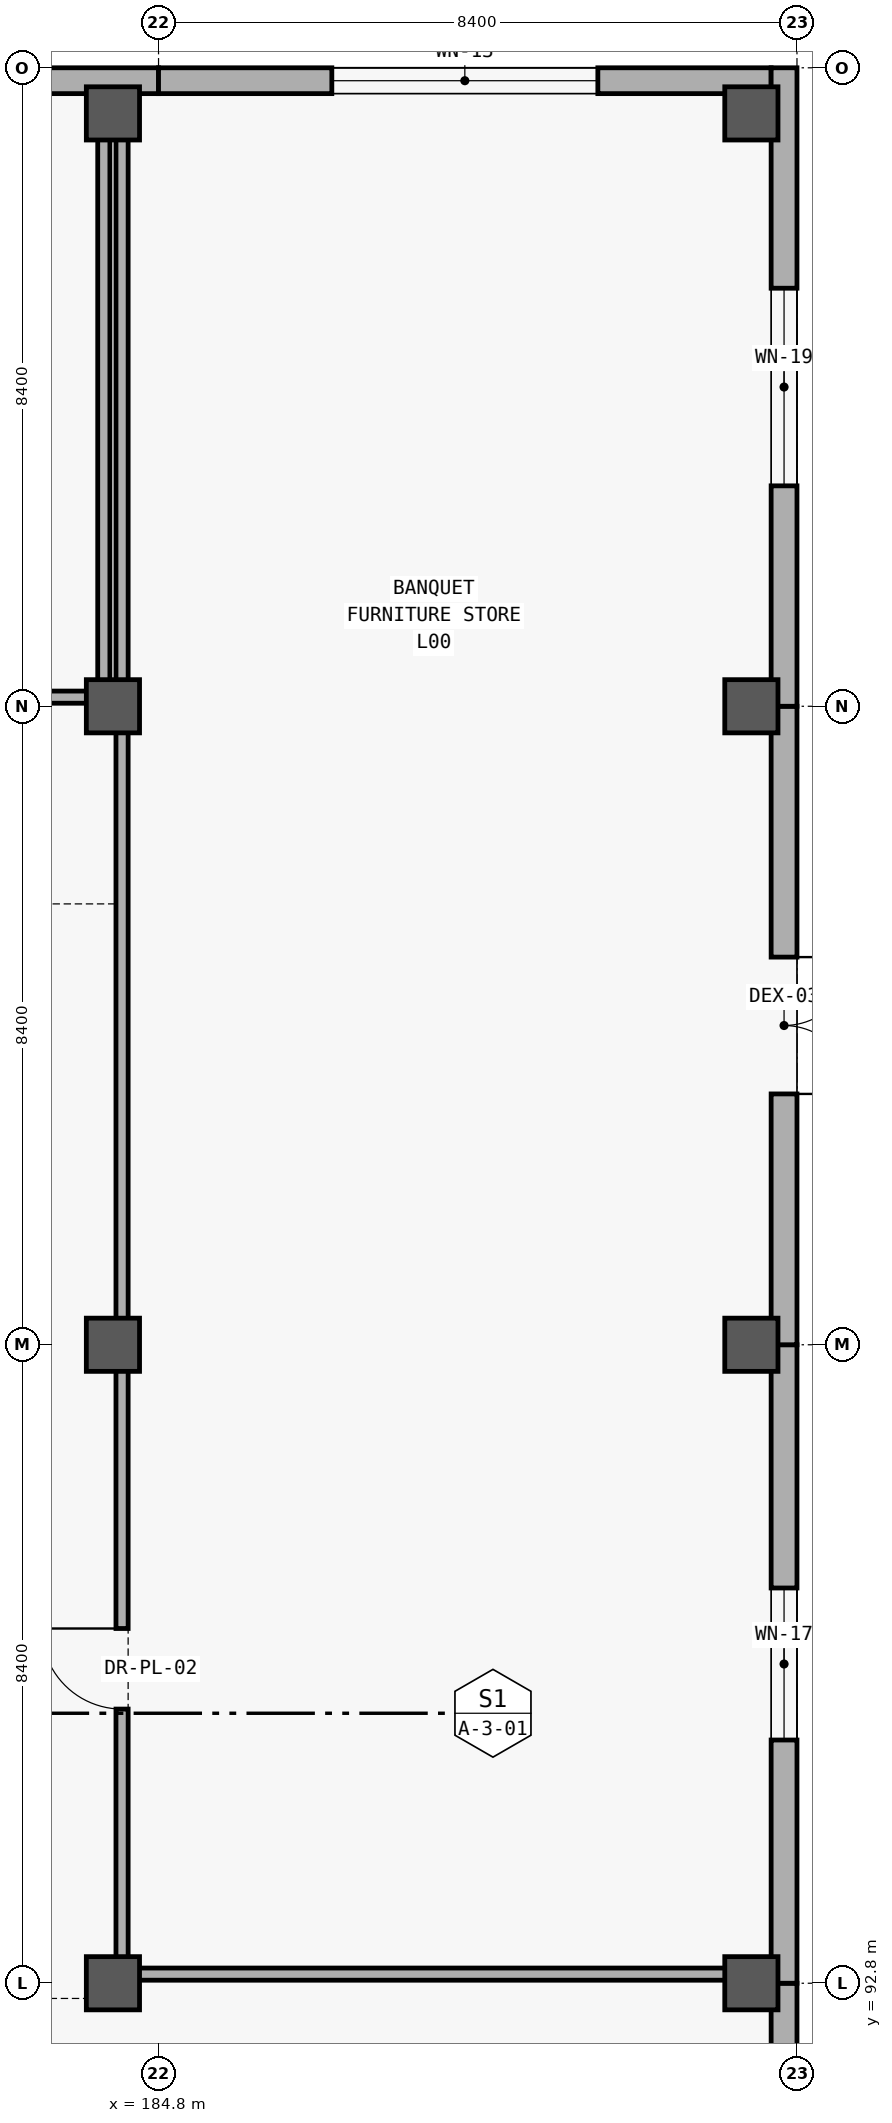
"""IFC4 building model, lengths in metres.
Left out: names, types, materials, properties, quantities, classifications, styles, units other than length and angle.
Written with IfcOpenShell. Run it as: python <this file> out.ifc"""

import sys

from ifc_helpers import new_model, si_unit, direction, frame, frame_2d, origin, origin_2d, place, context, subcontext, project, spatial, rectangle, extrude, element, fill, save


model = new_model("IFC4")
c1 = context("Model", 3, precision=1e-05, world=origin(), true_north=direction((0.0, 1.0)))
c2 = subcontext(c1, "Body", "Model", "MODEL_VIEW")
j1 = project(units=[si_unit("LENGTHUNIT", "METRE"), si_unit("PLANEANGLEUNIT", "RADIAN")], contexts=[c1])
p1 = place(None, origin())
s1 = spatial("IfcSite", under=j1, at=p1, CompositionType="ELEMENT")
p2 = place(p1, origin())
s2 = spatial("IfcBuilding", under=s1, at=p2, CompositionType="ELEMENT")
p3 = place(p2, origin())
s3 = spatial("IfcBuildingStorey", under=s2, at=p3, CompositionType="ELEMENT", Elevation=0.0)
for number, where, z_axis, x_axis in (
    (1, (184.2, 92.8, 0.0), (0.0, 0.0, 1.0), (1.0, 0.0, 0.0)),
    (2, (184.2, 101.2, 0.0), (0.0, 0.0, 1.0), (1.0, 0.0, 0.0)),
    (3, (184.2, 109.6, 0.0), (0.0, 0.0, 1.0), (1.0, 0.0, 0.0)),
    (4, (184.2, 117.4, 0.0), (0.0, 0.0, 1.0), (1.0, 0.0, 0.0)),
    (5, (192.6, 92.8, 0.0), (0.0, 0.0, 1.0), (1.0, 0.0, 0.0)),
    (6, (192.6, 101.2, 0.0), (0.0, 0.0, 1.0), (1.0, 0.0, 0.0)),
    (7, (192.6, 109.6, 0.0), (0.0, 0.0, 1.0), (1.0, 0.0, 0.0)),
    (8, (192.6, 117.4, 0.0), (0.0, 0.0, 1.0), (1.0, 0.0, 0.0)),
):
    element("IfcColumn", number, at=place(p3, frame(where, z_axis=z_axis, x_axis=x_axis)), inside=s3, PredefinedType="COLUMN", context=c2, shape_type="SweptSolid", body=[
        extrude(rectangle(XDim=0.7, YDim=0.7, at=origin_2d()), origin(), (0.0, 0.0, 1.0), 5.4),
    ])
p4 = place(p3, frame((176.4, 117.83, 0.0), z_axis=(0.0, 0.0, 1.0), x_axis=(1.0, 0.0, 0.0)))
e9 = element("IfcWall", 9, at=p4, inside=s3, PredefinedType="SOLIDWALL", context=c2, shape_type="SweptSolid", body=[
    extrude(rectangle(XDim=8.4, YDim=0.34, at=frame_2d((4.2, 0.0))), origin(), (0.0, 0.0, 1.0), 5.08),
])
p5 = place(p4, frame((3.2, 0.0, 0.0)))
e10 = element("IfcOpeningElement", 10, at=p5, cuts=e9, PredefinedType="OPENING", context=c2, shape_type="SweptSolid", body=[
    extrude(rectangle(XDim=2.0, YDim=2.6, at=frame_2d((1.0, 1.3))), frame((0.0, 0.18, 0.0), z_axis=(0.0, -1.0, 0.0), x_axis=(1.0, 0.0, 0.0)), (0.0, 0.0, 1.0), 0.36),
])
p6 = place(p3, frame((184.8, 117.83, 0.0), z_axis=(0.0, 0.0, 1.0), x_axis=(1.0, 0.0, 0.0)))
e11 = element("IfcWall", 11, at=p6, inside=s3, PredefinedType="SOLIDWALL", context=c2, shape_type="SweptSolid", body=[
    extrude(rectangle(XDim=8.06, YDim=0.34, at=frame_2d((4.03, 0.0))), origin(), (0.0, 0.0, 1.0), 5.08),
])
p7 = place(p6, frame((2.28, 0.0, 0.9)))
e12 = element("IfcOpeningElement", 12, at=p7, cuts=e11, PredefinedType="OPENING", context=c2, shape_type="SweptSolid", body=[
    extrude(rectangle(XDim=3.5, YDim=2.0, at=frame_2d((1.75, 1.0))), frame((0.0, 0.18, 0.0), z_axis=(0.0, -1.0, 0.0), x_axis=(1.0, 0.0, 0.0)), (0.0, 0.0, 1.0), 0.36),
])
p8 = place(p3, frame((193.03, 92.8, 0.0), z_axis=(0.0, 0.0, 1.0), x_axis=(0.0, -1.0, 0.0)))
e13 = element("IfcWall", 13, at=p8, inside=s3, PredefinedType="SOLIDWALL", context=c2, shape_type="SweptSolid", body=[
    extrude(rectangle(XDim=8.4, YDim=0.34, at=frame_2d((4.2, 0.0))), origin(), (0.0, 0.0, 1.0), 5.08),
])
p9 = place(p8, frame((3.4, 0.0, 0.9)))
e14 = element("IfcOpeningElement", 14, at=p9, cuts=e13, PredefinedType="OPENING", context=c2, shape_type="SweptSolid", body=[
    extrude(rectangle(XDim=1.6, YDim=1.6, at=frame_2d((0.8, 0.8))), frame((0.0, 0.18, 0.0), z_axis=(0.0, -1.0, 0.0), x_axis=(1.0, 0.0, 0.0)), (0.0, 0.0, 1.0), 0.36),
])
p10 = place(p3, frame((193.03, 101.2, 0.0), z_axis=(0.0, 0.0, 1.0), x_axis=(0.0, -1.0, 0.0)))
e15 = element("IfcWall", 15, at=p10, inside=s3, PredefinedType="SOLIDWALL", context=c2, shape_type="SweptSolid", body=[
    extrude(rectangle(XDim=8.4, YDim=0.34, at=frame_2d((4.2, 0.0))), origin(), (0.0, 0.0, 1.0), 5.08),
])
p11 = place(p10, frame((3.2, 0.0, 0.9)))
e16 = element("IfcOpeningElement", 16, at=p11, cuts=e15, PredefinedType="OPENING", context=c2, shape_type="SweptSolid", body=[
    extrude(rectangle(XDim=2.0, YDim=1.65, at=frame_2d((1.0, 0.825))), frame((0.0, 0.18, 0.0), z_axis=(0.0, -1.0, 0.0), x_axis=(1.0, 0.0, 0.0)), (0.0, 0.0, 1.0), 0.36),
])
p12 = place(p3, frame((193.03, 109.6, 0.0), z_axis=(0.0, 0.0, 1.0), x_axis=(0.0, -1.0, 0.0)))
e17 = element("IfcWall", 17, at=p12, inside=s3, PredefinedType="SOLIDWALL", context=c2, shape_type="SweptSolid", body=[
    extrude(rectangle(XDim=8.4, YDim=0.34, at=frame_2d((4.2, 0.0))), origin(), (0.0, 0.0, 1.0), 5.08),
])
p13 = place(p12, frame((3.3, 0.0, 0.0)))
e18 = element("IfcOpeningElement", 18, at=p13, cuts=e17, PredefinedType="OPENING", context=c2, shape_type="SweptSolid", body=[
    extrude(rectangle(XDim=1.8, YDim=2.4, at=frame_2d((0.9, 1.2))), frame((0.0, 0.18, 0.0), z_axis=(0.0, -1.0, 0.0), x_axis=(1.0, 0.0, 0.0)), (0.0, 0.0, 1.0), 0.36),
])
p14 = place(p3, frame((193.03, 118.0, 0.0), z_axis=(0.0, 0.0, 1.0), x_axis=(0.0, -1.0, 0.0)))
e19 = element("IfcWall", 19, at=p14, inside=s3, PredefinedType="SOLIDWALL", context=c2, shape_type="SweptSolid", body=[
    extrude(rectangle(XDim=8.4, YDim=0.34, at=frame_2d((4.2, 0.0))), origin(), (0.0, 0.0, 1.0), 5.08),
])
p15 = place(p14, frame((2.9, 0.0, 0.9)))
e20 = element("IfcOpeningElement", 20, at=p15, cuts=e19, PredefinedType="OPENING", context=c2, shape_type="SweptSolid", body=[
    extrude(rectangle(XDim=2.6, YDim=2.2, at=frame_2d((1.3, 1.1))), frame((0.0, 0.18, 0.0), z_axis=(0.0, -1.0, 0.0), x_axis=(1.0, 0.0, 0.0)), (0.0, 0.0, 1.0), 0.36),
])
p16 = place(p3, frame((184.32, 92.92, 0.0), z_axis=(0.0, 0.0, 1.0), x_axis=(0.0, 1.0, 0.0)))
e21 = element("IfcWall", 21, at=p16, inside=s3, PredefinedType="PARTITIONING", context=c2, shape_type="SweptSolid", body=[
    extrude(rectangle(XDim=24.74, YDim=0.16, at=frame_2d((12.37, 0.0))), origin(), (0.0, 0.0, 1.0), 4.18),
])
p17 = place(p16, frame((3.487, 0.0, 0.0)))
e22 = element("IfcOpeningElement", 22, at=p17, cuts=e21, PredefinedType="OPENING", context=c2, shape_type="SweptSolid", body=[
    extrude(rectangle(XDim=1.06, YDim=2.2, at=frame_2d((0.53, 1.1))), frame((0.0, 0.09, 0.0), z_axis=(0.0, -1.0, 0.0), x_axis=(1.0, 0.0, 0.0)), (0.0, 0.0, 1.0), 0.18),
])
p18 = place(p3, frame((157.57, 109.72, 0.0), z_axis=(0.0, 0.0, 1.0), x_axis=(1.0, 0.0, 0.0)))
e23 = element("IfcWall", 23, at=p18, inside=s3, PredefinedType="PARTITIONING", context=c2, shape_type="SweptSolid", body=[
    extrude(rectangle(XDim=26.51, YDim=0.16, at=frame_2d((13.255, 0.0))), origin(), (0.0, 0.0, 1.0), 4.18),
])
p19 = place(p3, frame((184.08, 109.72, 0.0), z_axis=(0.0, 0.0, 1.0), x_axis=(0.0, 1.0, 0.0)))
e24 = element("IfcWall", 24, at=p19, inside=s3, PredefinedType="PARTITIONING", context=c2, shape_type="SweptSolid", body=[
    extrude(rectangle(XDim=7.94, YDim=0.16, at=frame_2d((3.97, 0.0))), origin(), (0.0, 0.0, 1.0), 4.18),
])
p20 = place(p3, frame((184.32, 92.92, 0.0), z_axis=(0.0, 0.0, 1.0), x_axis=(1.0, 0.0, 0.0)))
e25 = element("IfcWall", 25, at=p20, inside=s3, PredefinedType="PARTITIONING", context=c2, shape_type="SweptSolid", body=[
    extrude(rectangle(XDim=8.54, YDim=0.16, at=frame_2d((4.27, 0.0))), origin(), (0.0, 0.0, 1.0), 4.18),
])
p21 = place(p7, origin())
e26 = element("IfcWindow", 26, at=p21, inside=s3, PartitioningType="SINGLE_PANEL", PredefinedType="WINDOW", context=c2, shape_type="SweptSolid", body=[
    extrude(rectangle(XDim=3.5, YDim=2.0, at=frame_2d((1.75, 1.0))), frame((0.0, 0.03, 0.0), z_axis=(0.0, -1.0, 0.0), x_axis=(1.0, 0.0, 0.0)), (0.0, 0.0, 1.0), 0.06),
])
fill(e12, e26)
p22 = place(p11, origin())
e27 = element("IfcWindow", 27, at=p22, inside=s3, PartitioningType="SINGLE_PANEL", PredefinedType="WINDOW", context=c2, shape_type="SweptSolid", body=[
    extrude(rectangle(XDim=2.0, YDim=1.65, at=frame_2d((1.0, 0.825))), frame((0.0, 0.03, 0.0), z_axis=(0.0, -1.0, 0.0), x_axis=(1.0, 0.0, 0.0)), (0.0, 0.0, 1.0), 0.06),
])
fill(e16, e27)
p23 = place(p13, origin())
e28 = element("IfcDoor", 28, at=p23, inside=s3, OperationType="DOUBLE_DOOR_SINGLE_SWING", PredefinedType="DOOR", context=c2, shape_type="SweptSolid", body=[
    extrude(rectangle(XDim=1.8, YDim=2.4, at=frame_2d((0.9, 1.2))), frame((0.0, 0.025, 0.0), z_axis=(0.0, -1.0, 0.0), x_axis=(1.0, 0.0, 0.0)), (0.0, 0.0, 1.0), 0.05),
])
fill(e18, e28)
p24 = place(p15, origin())
e29 = element("IfcWindow", 29, at=p24, inside=s3, PartitioningType="SINGLE_PANEL", PredefinedType="WINDOW", context=c2, shape_type="SweptSolid", body=[
    extrude(rectangle(XDim=2.6, YDim=2.2, at=frame_2d((1.3, 1.1))), frame((0.0, 0.03, 0.0), z_axis=(0.0, -1.0, 0.0), x_axis=(1.0, 0.0, 0.0)), (0.0, 0.0, 1.0), 0.06),
])
fill(e20, e29)
p25 = place(p17, origin())
e30 = element("IfcDoor", 30, at=p25, inside=s3, OperationType="SINGLE_SWING_RIGHT", PredefinedType="DOOR", context=c2, shape_type="SweptSolid", body=[
    extrude(rectangle(XDim=1.06, YDim=2.2, at=frame_2d((0.53, 1.1))), frame((0.0, 0.025, 0.0), z_axis=(0.0, -1.0, 0.0), x_axis=(1.0, 0.0, 0.0)), (0.0, 0.0, 1.0), 0.05),
])
fill(e22, e30)
save(model, sys.argv[1])
